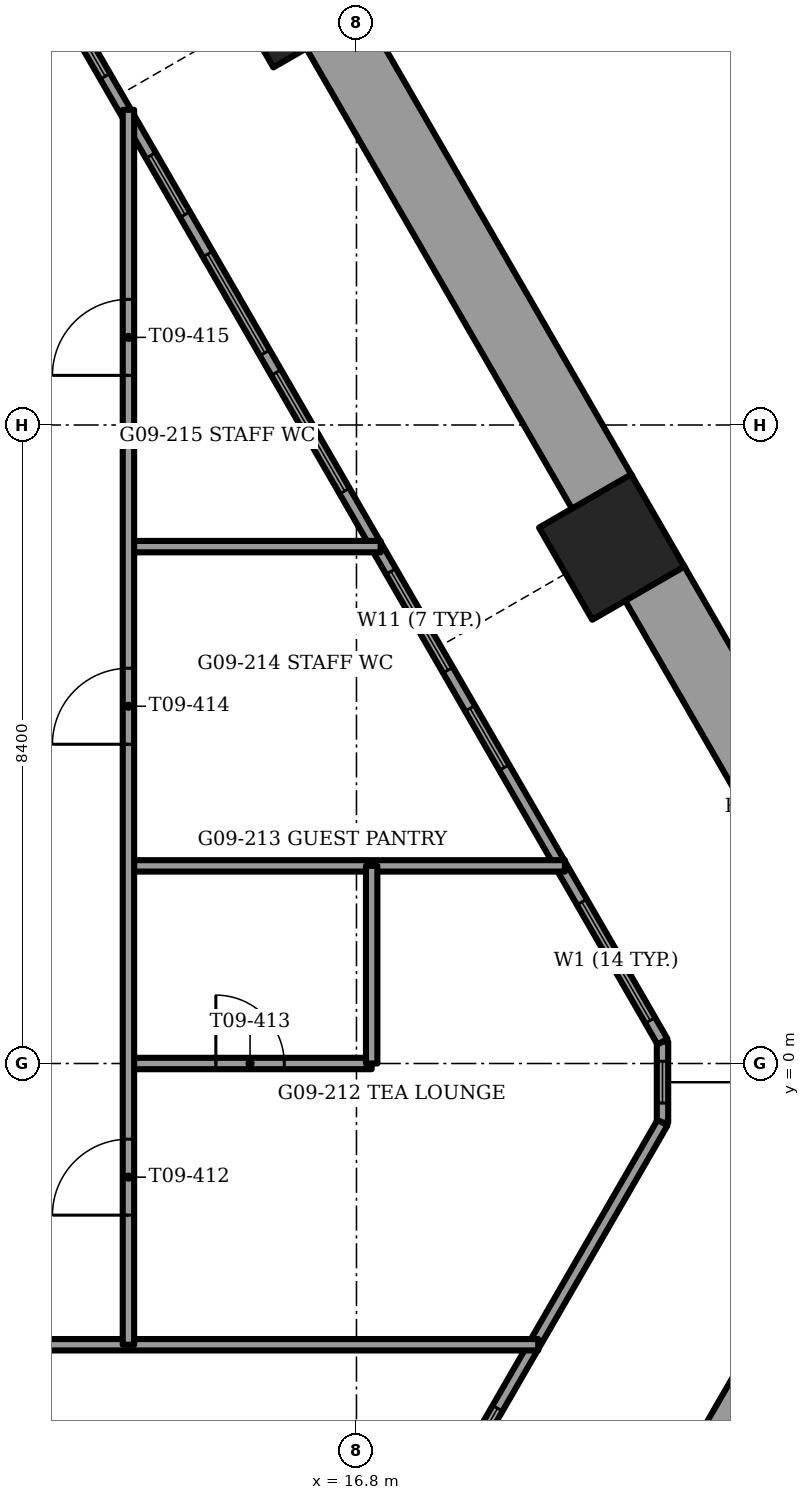
"""IFC4 building model, lengths in metres.
Left out: names, types, materials, properties, quantities, classifications, styles, units other than length and angle.
Written with IfcOpenShell. Run it as: python <this file> out.ifc"""

import sys

from ifc_helpers import new_model, si_unit, direction, frame, frame_2d, origin, origin_2d, place, context, subcontext, project, spatial, rectangle, extrude, element, fill, save


model = new_model("IFC4")
c1 = context("Model", 3, precision=1e-05, world=origin(), true_north=direction((0.0, 1.0)))
c2 = subcontext(c1, "Body", "Model", "MODEL_VIEW")
j1 = project(units=[si_unit("LENGTHUNIT", "METRE"), si_unit("PLANEANGLEUNIT", "RADIAN")], contexts=[c1])
p1 = place(None, origin())
s1 = spatial("IfcSite", under=j1, at=p1, CompositionType="ELEMENT")
p2 = place(p1, origin())
s2 = spatial("IfcBuilding", under=s1, at=p2, CompositionType="ELEMENT")
p3 = place(p2, frame((0.0, 0.0, 39.25)))
s3 = spatial("IfcBuildingStorey", under=s2, at=p3, CompositionType="ELEMENT", Elevation=39.25)
for number, where, z_axis, x_axis in (
    (1, (20.158, 6.794, -1.2), (0.0, 0.0, 1.0), (0.5, -0.866, 0.0)),
    (2, (15.963, 14.061, -1.2), (0.0, 0.0, 1.0), (0.5, -0.866, 0.0)),
):
    element("IfcColumn", number, at=place(p3, frame(where, z_axis=z_axis, x_axis=x_axis)), inside=s3, PredefinedType="COLUMN", context=c2, shape_type="SweptSolid", body=[
        extrude(rectangle(XDim=1.4, YDim=1.4, at=origin_2d()), origin(), (0.0, 0.0, 1.0), 3.75),
    ])
p4 = place(p3, frame((20.922, -6.461, 0.0), z_axis=(0.0, 0.0, 1.0), x_axis=(0.499983599745, 0.866034872269, 0.0)))
e3 = element("IfcWall", 3, at=p4, inside=s3, PredefinedType="PARAPET", context=c2, shape_type="SweptSolid", body=[
    extrude(rectangle(XDim=6.42, YDim=0.9, at=frame_2d((3.21, 0.0))), origin(), (0.0, 0.0, 1.0), 1.1),
])
p5 = place(p3, frame((24.132, 0.41, 0.0), z_axis=(0.0, 0.0, 1.0), x_axis=(-0.499994135611, 0.866028789565, 0.0)))
e4 = element("IfcWall", 4, at=p5, inside=s3, PredefinedType="PARAPET", context=c2, shape_type="SweptSolid", body=[
    extrude(rectangle(XDim=6.845, YDim=0.9, at=frame_2d((3.423, 0.0))), origin(), (0.0, 0.0, 1.0), 1.1),
])
p6 = place(p3, frame((20.04, 7.499, 0.0), z_axis=(0.0, 0.0, 1.0), x_axis=(-0.499997206141, 0.866027016814, 0.0)))
e5 = element("IfcWall", 5, at=p6, inside=s3, PredefinedType="PARAPET", context=c2, shape_type="SweptSolid", body=[
    extrude(rectangle(XDim=7.051, YDim=0.9, at=frame_2d((3.525, 0.0))), origin(), (0.0, 0.0, 1.0), 1.1),
])
p7 = place(p3, frame((11.087, -17.647, 0.0), z_axis=(0.0, 0.0, 1.0), x_axis=(0.499999841607, 0.866025495233, 0.0)))
e6 = element("IfcWall", 6, at=p7, inside=s3, PredefinedType="SOLIDWALL", context=c2, shape_type="SweptSolid", body=[
    extrude(rectangle(XDim=19.479, YDim=0.15, at=frame_2d((9.739, 0.0))), origin(), (0.0, 0.0, 1.0), 3.45),
])
p8 = place(p7, frame((1.639, 0.0, 0.15)))
e7 = element("IfcOpeningElement", 7, at=p8, cuts=e6, PredefinedType="OPENING", context=c2, shape_type="SweptSolid", body=[
    extrude(rectangle(XDim=1.8, YDim=2.85, at=frame_2d((0.9, 1.425))), frame((0.0, 0.075, 0.0), z_axis=(0.0, -1.0, 0.0), x_axis=(1.0, 0.0, 0.0)), (0.0, 0.0, 1.0), 0.15),
])
p9 = place(p7, frame((3.739, 0.0, 0.0)))
e8 = element("IfcOpeningElement", 8, at=p9, cuts=e6, PredefinedType="OPENING", context=c2, shape_type="SweptSolid", body=[
    extrude(rectangle(XDim=1.5, YDim=2.4, at=frame_2d((0.75, 1.2))), frame((0.0, 0.075, 0.0), z_axis=(0.0, -1.0, 0.0), x_axis=(1.0, 0.0, 0.0)), (0.0, 0.0, 1.0), 0.15),
])
p10 = place(p7, frame((5.839, 0.0, 0.15)))
e9 = element("IfcOpeningElement", 9, at=p10, cuts=e6, PredefinedType="OPENING", context=c2, shape_type="SweptSolid", body=[
    extrude(rectangle(XDim=1.8, YDim=2.85, at=frame_2d((0.9, 1.425))), frame((0.0, 0.075, 0.0), z_axis=(0.0, -1.0, 0.0), x_axis=(1.0, 0.0, 0.0)), (0.0, 0.0, 1.0), 0.15),
])
p11 = place(p7, frame((7.939, 0.0, 0.0)))
e10 = element("IfcOpeningElement", 10, at=p11, cuts=e6, PredefinedType="OPENING", context=c2, shape_type="SweptSolid", body=[
    extrude(rectangle(XDim=1.5, YDim=2.4, at=frame_2d((0.75, 1.2))), frame((0.0, 0.075, 0.0), z_axis=(0.0, -1.0, 0.0), x_axis=(1.0, 0.0, 0.0)), (0.0, 0.0, 1.0), 0.15),
])
p12 = place(p7, frame((10.039, 0.0, 0.15)))
e11 = element("IfcOpeningElement", 11, at=p12, cuts=e6, PredefinedType="OPENING", context=c2, shape_type="SweptSolid", body=[
    extrude(rectangle(XDim=1.8, YDim=2.85, at=frame_2d((0.9, 1.425))), frame((0.0, 0.075, 0.0), z_axis=(0.0, -1.0, 0.0), x_axis=(1.0, 0.0, 0.0)), (0.0, 0.0, 1.0), 0.15),
])
p13 = place(p7, frame((12.139, 0.0, 0.0)))
e12 = element("IfcOpeningElement", 12, at=p13, cuts=e6, PredefinedType="OPENING", context=c2, shape_type="SweptSolid", body=[
    extrude(rectangle(XDim=1.5, YDim=2.4, at=frame_2d((0.75, 1.2))), frame((0.0, 0.075, 0.0), z_axis=(0.0, -1.0, 0.0), x_axis=(1.0, 0.0, 0.0)), (0.0, 0.0, 1.0), 0.15),
])
p14 = place(p7, frame((14.239, 0.0, 0.15)))
e13 = element("IfcOpeningElement", 13, at=p14, cuts=e6, PredefinedType="OPENING", context=c2, shape_type="SweptSolid", body=[
    extrude(rectangle(XDim=0.9, YDim=2.85, at=frame_2d((0.45, 1.425))), frame((0.0, 0.075, 0.0), z_axis=(0.0, -1.0, 0.0), x_axis=(1.0, 0.0, 0.0)), (0.0, 0.0, 1.0), 0.15),
])
p15 = place(p3, frame((20.826, 0.287, 0.0), z_axis=(0.0, 0.0, 1.0), x_axis=(-0.500006057782, 0.866021906294, 0.0)))
e14 = element("IfcWall", 14, at=p15, inside=s3, PredefinedType="SOLIDWALL", context=c2, shape_type="SweptSolid", body=[
    extrude(rectangle(XDim=23.1, YDim=0.15, at=frame_2d((11.55, 0.0))), origin(), (0.0, 0.0, 1.0), 3.45),
])
p16 = place(p15, frame((4.165, 0.0, 0.15)))
e15 = element("IfcOpeningElement", 15, at=p16, cuts=e14, PredefinedType="OPENING", context=c2, shape_type="SweptSolid", body=[
    extrude(rectangle(XDim=0.9, YDim=2.85, at=frame_2d((0.45, 1.425))), frame((0.0, 0.075, 0.0), z_axis=(0.0, -1.0, 0.0), x_axis=(1.0, 0.0, 0.0)), (0.0, 0.0, 1.0), 0.15),
])
p17 = place(p15, frame((5.645, 0.0, 0.15)))
e16 = element("IfcOpeningElement", 16, at=p17, cuts=e14, PredefinedType="OPENING", context=c2, shape_type="SweptSolid", body=[
    extrude(rectangle(XDim=1.5, YDim=2.85, at=frame_2d((0.75, 1.425))), frame((0.0, 0.075, 0.0), z_axis=(0.0, -1.0, 0.0), x_axis=(1.0, 0.0, 0.0)), (0.0, 0.0, 1.0), 0.15),
])
p18 = place(p15, frame((8.365, 0.0, 0.15)))
e17 = element("IfcOpeningElement", 17, at=p18, cuts=e14, PredefinedType="OPENING", context=c2, shape_type="SweptSolid", body=[
    extrude(rectangle(XDim=1.8, YDim=2.85, at=frame_2d((0.9, 1.425))), frame((0.0, 0.075, 0.0), z_axis=(0.0, -1.0, 0.0), x_axis=(1.0, 0.0, 0.0)), (0.0, 0.0, 1.0), 0.15),
])
p19 = place(p15, frame((10.465, 0.0, 0.15)))
e18 = element("IfcOpeningElement", 18, at=p19, cuts=e14, PredefinedType="OPENING", context=c2, shape_type="SweptSolid", body=[
    extrude(rectangle(XDim=1.5, YDim=2.85, at=frame_2d((0.75, 1.425))), frame((0.0, 0.075, 0.0), z_axis=(0.0, -1.0, 0.0), x_axis=(1.0, 0.0, 0.0)), (0.0, 0.0, 1.0), 0.15),
])
p20 = place(p15, frame((12.564, 0.0, 0.15)))
e19 = element("IfcOpeningElement", 19, at=p20, cuts=e14, PredefinedType="OPENING", context=c2, shape_type="SweptSolid", body=[
    extrude(rectangle(XDim=0.9, YDim=2.85, at=frame_2d((0.45, 1.425))), frame((0.0, 0.075, 0.0), z_axis=(0.0, -1.0, 0.0), x_axis=(1.0, 0.0, 0.0)), (0.0, 0.0, 1.0), 0.15),
])
p21 = place(p15, frame((14.665, 0.0, 0.15)))
e20 = element("IfcOpeningElement", 20, at=p21, cuts=e14, PredefinedType="OPENING", context=c2, shape_type="SweptSolid", body=[
    extrude(rectangle(XDim=1.5, YDim=2.85, at=frame_2d((0.75, 1.425))), frame((0.0, 0.075, 0.0), z_axis=(0.0, -1.0, 0.0), x_axis=(1.0, 0.0, 0.0)), (0.0, 0.0, 1.0), 0.15),
])
p22 = place(p15, frame((17.775, 0.0, 0.15)))
e21 = element("IfcOpeningElement", 21, at=p22, cuts=e14, PredefinedType="OPENING", context=c2, shape_type="SweptSolid", body=[
    extrude(rectangle(XDim=0.9, YDim=2.85, at=frame_2d((0.45, 1.425))), frame((0.0, 0.075, 0.0), z_axis=(0.0, -1.0, 0.0), x_axis=(1.0, 0.0, 0.0)), (0.0, 0.0, 1.0), 0.15),
])
p23 = place(p15, frame((18.865, 0.0, 0.0)))
e22 = element("IfcOpeningElement", 22, at=p23, cuts=e14, PredefinedType="OPENING", context=c2, shape_type="SweptSolid", body=[
    extrude(rectangle(XDim=1.5, YDim=2.4, at=frame_2d((0.75, 1.2))), frame((0.0, 0.075, 0.0), z_axis=(0.0, -1.0, 0.0), x_axis=(1.0, 0.0, 0.0)), (0.0, 0.0, 1.0), 0.15),
])
p24 = place(p15, frame((0.322, 0.0, 0.15)))
e23 = element("IfcOpeningElement", 23, at=p24, cuts=e14, PredefinedType="OPENING", context=c2, shape_type="SweptSolid", body=[
    extrude(rectangle(XDim=1.8, YDim=2.73, at=frame_2d((0.9, 1.365))), frame((0.0, 0.075, 0.0), z_axis=(0.0, -1.0, 0.0), x_axis=(1.0, 0.0, 0.0)), (0.0, 0.0, 1.0), 0.15),
])
p25 = place(p15, frame((21.032, 0.0, 0.15)))
e24 = element("IfcOpeningElement", 24, at=p25, cuts=e14, PredefinedType="OPENING", context=c2, shape_type="SweptSolid", body=[
    extrude(rectangle(XDim=1.8, YDim=2.73, at=frame_2d((0.9, 1.365))), frame((0.0, 0.075, 0.0), z_axis=(0.0, -1.0, 0.0), x_axis=(1.0, 0.0, 0.0)), (0.0, 0.0, 1.0), 0.15),
])
p26 = place(p3, frame((20.826, -0.778, 0.0), z_axis=(0.0, 0.0, 1.0), x_axis=(0.0, 1.0, 0.0)))
e25 = element("IfcWall", 25, at=p26, inside=s3, PredefinedType="SOLIDWALL", context=c2, shape_type="SweptSolid", body=[
    extrude(rectangle(XDim=1.065, YDim=0.15, at=frame_2d((0.533, 0.0))), origin(), (0.0, 0.0, 1.0), 3.45),
])
p27 = place(p26, frame((0.258, 0.0, 0.15)))
e26 = element("IfcOpeningElement", 26, at=p27, cuts=e25, PredefinedType="OPENING", context=c2, shape_type="SweptSolid", body=[
    extrude(rectangle(XDim=0.55, YDim=2.85, at=frame_2d((0.275, 1.425))), frame((0.0, 0.075, 0.0), z_axis=(0.0, -1.0, 0.0), x_axis=(1.0, 0.0, 0.0)), (0.0, 0.0, 1.0), 0.15),
])
p28 = place(p3, frame((9.16, -3.7, 0.0), z_axis=(0.0, 0.0, 1.0), x_axis=(1.0, 0.0, 0.0)))
e27 = element("IfcWall", 27, at=p28, inside=s3, PredefinedType="PARTITIONING", context=c2, shape_type="SweptSolid", body=[
    extrude(rectangle(XDim=10.031, YDim=0.15, at=frame_2d((5.016, 0.0))), origin(), (0.0, 0.0, 1.0), 3.45),
])
p29 = place(p28, frame((1.84, 0.0, 0.0)))
e28 = element("IfcOpeningElement", 28, at=p29, cuts=e27, PredefinedType="OPENING", context=c2, shape_type="SweptSolid", body=[
    extrude(rectangle(XDim=1.0, YDim=2.1, at=frame_2d((0.5, 1.05))), frame((0.0, 0.075, 0.0), z_axis=(0.0, -1.0, 0.0), x_axis=(1.0, 0.0, 0.0)), (0.0, 0.0, 1.0), 0.15),
])
p30 = place(p3, frame((13.8, 0.0, 0.0), z_axis=(0.0, 0.0, 1.0), x_axis=(1.0, 0.0, 0.0)))
e29 = element("IfcWall", 29, at=p30, inside=s3, PredefinedType="PARTITIONING", context=c2, shape_type="SweptSolid", body=[
    extrude(rectangle(XDim=3.2, YDim=0.15, at=frame_2d((1.6, 0.0))), origin(), (0.0, 0.0, 1.0), 3.45),
])
p31 = place(p30, frame((1.15, 0.0, 0.0)))
e30 = element("IfcOpeningElement", 30, at=p31, cuts=e29, PredefinedType="OPENING", context=c2, shape_type="SweptSolid", body=[
    extrude(rectangle(XDim=0.9, YDim=2.1, at=frame_2d((0.45, 1.05))), frame((0.0, 0.075, 0.0), z_axis=(0.0, -1.0, 0.0), x_axis=(1.0, 0.0, 0.0)), (0.0, 0.0, 1.0), 0.15),
])
p32 = place(p3, frame((13.8, 2.6, 0.0), z_axis=(0.0, 0.0, 1.0), x_axis=(1.0, 0.0, 0.0)))
e31 = element("IfcWall", 31, at=p32, inside=s3, PredefinedType="PARTITIONING", context=c2, shape_type="SweptSolid", body=[
    extrude(rectangle(XDim=5.743, YDim=0.15, at=frame_2d((2.872, 0.0))), origin(), (0.0, 0.0, 1.0), 3.45),
])
p33 = place(p3, frame((13.8, 6.8, 0.0), z_axis=(0.0, 0.0, 1.0), x_axis=(1.0, 0.0, 0.0)))
e32 = element("IfcWall", 32, at=p33, inside=s3, PredefinedType="PARTITIONING", context=c2, shape_type="SweptSolid", body=[
    extrude(rectangle(XDim=3.318, YDim=0.15, at=frame_2d((1.659, 0.0))), origin(), (0.0, 0.0, 1.0), 3.45),
])
p34 = place(p3, frame((17.0, 0.0, 0.0), z_axis=(0.0, 0.0, 1.0), x_axis=(0.0, 1.0, 0.0)))
e33 = element("IfcWall", 33, at=p34, inside=s3, PredefinedType="PARTITIONING", context=c2, shape_type="SweptSolid", body=[
    extrude(rectangle(XDim=2.6, YDim=0.15, at=frame_2d((1.3, 0.0))), origin(), (0.0, 0.0, 1.0), 3.45),
])
p35 = place(p3, frame((13.8, -3.7, 0.0), z_axis=(0.0, 0.0, 1.0), x_axis=(0.0, 1.0, 0.0)))
e34 = element("IfcWall", 34, at=p35, inside=s3, PredefinedType="PARTITIONING", context=c2, shape_type="SweptSolid", body=[
    extrude(rectangle(XDim=16.247, YDim=0.15, at=frame_2d((8.124, 0.0))), origin(), (0.0, 0.0, 1.0), 3.45),
])
p36 = place(p35, frame((1.705, 0.0, 0.0)))
e35 = element("IfcOpeningElement", 35, at=p36, cuts=e34, PredefinedType="OPENING", context=c2, shape_type="SweptSolid", body=[
    extrude(rectangle(XDim=1.0, YDim=2.1, at=frame_2d((0.5, 1.05))), frame((0.0, 0.075, 0.0), z_axis=(0.0, -1.0, 0.0), x_axis=(1.0, 0.0, 0.0)), (0.0, 0.0, 1.0), 0.15),
])
p37 = place(p35, frame((7.9, 0.0, 0.0)))
e36 = element("IfcOpeningElement", 36, at=p37, cuts=e34, PredefinedType="OPENING", context=c2, shape_type="SweptSolid", body=[
    extrude(rectangle(XDim=1.0, YDim=2.1, at=frame_2d((0.5, 1.05))), frame((0.0, 0.075, 0.0), z_axis=(0.0, -1.0, 0.0), x_axis=(1.0, 0.0, 0.0)), (0.0, 0.0, 1.0), 0.15),
])
p38 = place(p35, frame((12.753, 0.0, 0.0)))
e37 = element("IfcOpeningElement", 37, at=p38, cuts=e34, PredefinedType="OPENING", context=c2, shape_type="SweptSolid", body=[
    extrude(rectangle(XDim=1.0, YDim=2.1, at=frame_2d((0.5, 1.05))), frame((0.0, 0.075, 0.0), z_axis=(0.0, -1.0, 0.0), x_axis=(1.0, 0.0, 0.0)), (0.0, 0.0, 1.0), 0.15),
])
p39 = place(p14, origin())
e38 = element("IfcWindow", 38, at=p39, inside=s3, PartitioningType="SINGLE_PANEL", PredefinedType="WINDOW", context=c2, shape_type="SweptSolid", body=[
    extrude(rectangle(XDim=0.9, YDim=2.85, at=frame_2d((0.45, 1.425))), frame((0.0, 0.03, 0.0), z_axis=(0.0, -1.0, 0.0), x_axis=(1.0, 0.0, 0.0)), (0.0, 0.0, 1.0), 0.06),
])
fill(e13, e38)
p40 = place(p16, origin())
e39 = element("IfcWindow", 39, at=p40, inside=s3, PartitioningType="SINGLE_PANEL", PredefinedType="WINDOW", context=c2, shape_type="SweptSolid", body=[
    extrude(rectangle(XDim=0.9, YDim=2.85, at=frame_2d((0.45, 1.425))), frame((0.0, 0.03, 0.0), z_axis=(0.0, -1.0, 0.0), x_axis=(1.0, 0.0, 0.0)), (0.0, 0.0, 1.0), 0.06),
])
fill(e15, e39)
p41 = place(p17, origin())
e40 = element("IfcWindow", 40, at=p41, inside=s3, PartitioningType="SINGLE_PANEL", PredefinedType="WINDOW", context=c2, shape_type="SweptSolid", body=[
    extrude(rectangle(XDim=1.5, YDim=2.85, at=frame_2d((0.75, 1.425))), frame((0.0, 0.03, 0.0), z_axis=(0.0, -1.0, 0.0), x_axis=(1.0, 0.0, 0.0)), (0.0, 0.0, 1.0), 0.06),
])
fill(e16, e40)
p42 = place(p18, origin())
e41 = element("IfcWindow", 41, at=p42, inside=s3, PartitioningType="SINGLE_PANEL", PredefinedType="WINDOW", context=c2, shape_type="SweptSolid", body=[
    extrude(rectangle(XDim=1.8, YDim=2.85, at=frame_2d((0.9, 1.425))), frame((0.0, 0.03, 0.0), z_axis=(0.0, -1.0, 0.0), x_axis=(1.0, 0.0, 0.0)), (0.0, 0.0, 1.0), 0.06),
])
fill(e17, e41)
p43 = place(p19, origin())
e42 = element("IfcWindow", 42, at=p43, inside=s3, PartitioningType="SINGLE_PANEL", PredefinedType="WINDOW", context=c2, shape_type="SweptSolid", body=[
    extrude(rectangle(XDim=1.5, YDim=2.85, at=frame_2d((0.75, 1.425))), frame((0.0, 0.03, 0.0), z_axis=(0.0, -1.0, 0.0), x_axis=(1.0, 0.0, 0.0)), (0.0, 0.0, 1.0), 0.06),
])
fill(e18, e42)
p44 = place(p20, origin())
e43 = element("IfcWindow", 43, at=p44, inside=s3, PartitioningType="SINGLE_PANEL", PredefinedType="WINDOW", context=c2, shape_type="SweptSolid", body=[
    extrude(rectangle(XDim=0.9, YDim=2.85, at=frame_2d((0.45, 1.425))), frame((0.0, 0.03, 0.0), z_axis=(0.0, -1.0, 0.0), x_axis=(1.0, 0.0, 0.0)), (0.0, 0.0, 1.0), 0.06),
])
fill(e19, e43)
p45 = place(p21, origin())
e44 = element("IfcWindow", 44, at=p45, inside=s3, PartitioningType="SINGLE_PANEL", PredefinedType="WINDOW", context=c2, shape_type="SweptSolid", body=[
    extrude(rectangle(XDim=1.5, YDim=2.85, at=frame_2d((0.75, 1.425))), frame((0.0, 0.03, 0.0), z_axis=(0.0, -1.0, 0.0), x_axis=(1.0, 0.0, 0.0)), (0.0, 0.0, 1.0), 0.06),
])
fill(e20, e44)
p46 = place(p24, origin())
e45 = element("IfcWindow", 45, at=p46, inside=s3, PartitioningType="SINGLE_PANEL", PredefinedType="WINDOW", context=c2, shape_type="SweptSolid", body=[
    extrude(rectangle(XDim=1.8, YDim=2.73, at=frame_2d((0.9, 1.365))), frame((0.0, 0.03, 0.0), z_axis=(0.0, -1.0, 0.0), x_axis=(1.0, 0.0, 0.0)), (0.0, 0.0, 1.0), 0.06),
])
fill(e23, e45)
p47 = place(p27, origin())
e46 = element("IfcWindow", 46, at=p47, inside=s3, PartitioningType="SINGLE_PANEL", PredefinedType="WINDOW", context=c2, shape_type="SweptSolid", body=[
    extrude(rectangle(XDim=0.55, YDim=2.85, at=frame_2d((0.275, 1.425))), frame((0.0, 0.03, 0.0), z_axis=(0.0, -1.0, 0.0), x_axis=(1.0, 0.0, 0.0)), (0.0, 0.0, 1.0), 0.06),
])
fill(e26, e46)
p48 = place(p36, origin())
e47 = element("IfcDoor", 47, at=p48, inside=s3, OperationType="SINGLE_SWING_LEFT", PredefinedType="DOOR", context=c2, shape_type="SweptSolid", body=[
    extrude(rectangle(XDim=1.0, YDim=2.1, at=frame_2d((0.5, 1.05))), frame((0.0, 0.025, 0.0), z_axis=(0.0, -1.0, 0.0), x_axis=(1.0, 0.0, 0.0)), (0.0, 0.0, 1.0), 0.05),
])
fill(e35, e47)
p49 = place(p31, origin())
e48 = element("IfcDoor", 48, at=p49, inside=s3, OperationType="SINGLE_SWING_LEFT", PredefinedType="DOOR", context=c2, shape_type="SweptSolid", body=[
    extrude(rectangle(XDim=0.9, YDim=2.1, at=frame_2d((0.45, 1.05))), frame((0.0, 0.025, 0.0), z_axis=(0.0, -1.0, 0.0), x_axis=(1.0, 0.0, 0.0)), (0.0, 0.0, 1.0), 0.05),
])
fill(e30, e48)
p50 = place(p37, origin())
e49 = element("IfcDoor", 49, at=p50, inside=s3, OperationType="SINGLE_SWING_LEFT", PredefinedType="DOOR", context=c2, shape_type="SweptSolid", body=[
    extrude(rectangle(XDim=1.0, YDim=2.1, at=frame_2d((0.5, 1.05))), frame((0.0, 0.025, 0.0), z_axis=(0.0, -1.0, 0.0), x_axis=(1.0, 0.0, 0.0)), (0.0, 0.0, 1.0), 0.05),
])
fill(e36, e49)
p51 = place(p38, origin())
e50 = element("IfcDoor", 50, at=p51, inside=s3, OperationType="SINGLE_SWING_LEFT", PredefinedType="DOOR", context=c2, shape_type="SweptSolid", body=[
    extrude(rectangle(XDim=1.0, YDim=2.1, at=frame_2d((0.5, 1.05))), frame((0.0, 0.025, 0.0), z_axis=(0.0, -1.0, 0.0), x_axis=(1.0, 0.0, 0.0)), (0.0, 0.0, 1.0), 0.05),
])
fill(e37, e50)
save(model, sys.argv[1])
